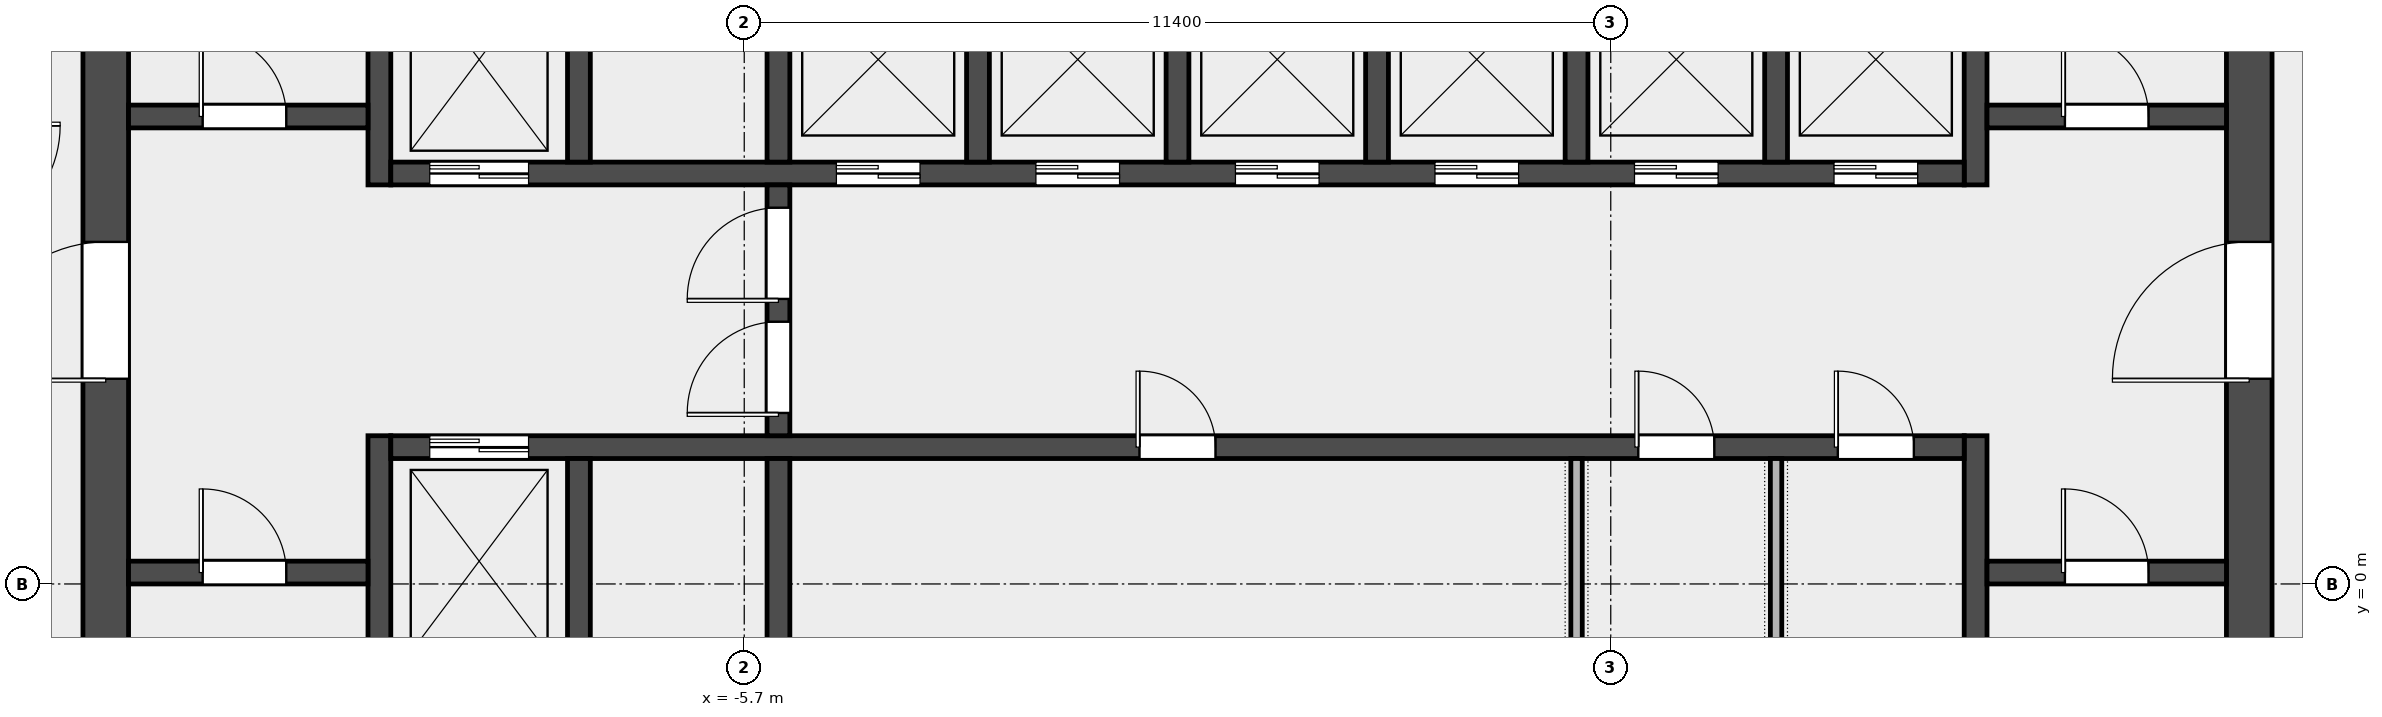
"""IFC4 building model, lengths in metres.
Left out: names, types, materials, properties, quantities, classifications, styles, units other than length and angle.
Written with IfcOpenShell. Run it as: python <this file> out.ifc"""

import sys

from ifc_helpers import new_model, si_unit, direction, frame, frame_2d, origin, place, context, subcontext, project, spatial, rectangle, extrude, element, fill, save


model = new_model("IFC4")
c1 = context("Model", 3, precision=1e-05, world=origin(), true_north=direction((0.0, 1.0)))
c2 = subcontext(c1, "Body", "Model", "MODEL_VIEW")
j1 = project(units=[si_unit("LENGTHUNIT", "METRE"), si_unit("PLANEANGLEUNIT", "RADIAN")], contexts=[c1])
p1 = place(None, origin())
s1 = spatial("IfcSite", under=j1, at=p1, CompositionType="ELEMENT")
p2 = place(p1, origin())
s2 = spatial("IfcBuilding", under=s1, at=p2, CompositionType="ELEMENT")
p3 = place(p2, frame((0.0, 0.0, 227.0)))
s3 = spatial("IfcBuildingStorey", under=s2, at=p3, CompositionType="ELEMENT", Elevation=227.0)
p4 = place(p3, frame((-14.1, -6.6, 0.0), z_axis=(0.0, 0.0, 1.0), x_axis=(0.0, 1.0, 0.0)))
e1 = element("IfcWall", 1, at=p4, inside=s3, PredefinedType="SHEAR", context=c2, shape_type="SweptSolid", body=[
    extrude(rectangle(XDim=19.5, YDim=0.6, at=frame_2d((9.75, 0.0))), origin(), (0.0, 0.0, 1.0), 3.7),
])
p5 = place(p4, frame((9.3, 0.0, 0.0)))
e2 = element("IfcOpeningElement", 2, at=p5, cuts=e1, PredefinedType="OPENING", context=c2, shape_type="SweptSolid", body=[
    extrude(rectangle(XDim=1.8, YDim=2.1, at=frame_2d((0.9, 1.05))), frame((0.0, 0.312, 0.0), z_axis=(0.0, -1.0, 0.0), x_axis=(1.0, 0.0, 0.0)), (0.0, 0.0, 1.0), 0.624),
])
p6 = place(p3, frame((14.1, -6.6, 0.0), z_axis=(0.0, 0.0, 1.0), x_axis=(0.0, 1.0, 0.0)))
e3 = element("IfcWall", 3, at=p6, inside=s3, PredefinedType="SHEAR", context=c2, shape_type="SweptSolid", body=[
    extrude(rectangle(XDim=19.5, YDim=0.6, at=frame_2d((9.75, 0.0))), origin(), (0.0, 0.0, 1.0), 3.7),
])
p7 = place(p6, frame((9.3, 0.0, 0.0)))
e4 = element("IfcOpeningElement", 4, at=p7, cuts=e3, PredefinedType="OPENING", context=c2, shape_type="SweptSolid", body=[
    extrude(rectangle(XDim=1.8, YDim=2.1, at=frame_2d((0.9, 1.05))), frame((0.0, 0.312, 0.0), z_axis=(0.0, -1.0, 0.0), x_axis=(1.0, 0.0, 0.0)), (0.0, 0.0, 1.0), 0.624),
])
p8 = place(p3, frame((-10.5, -6.6, 0.0), z_axis=(0.0, 0.0, 1.0), x_axis=(0.0, 1.0, 0.0)))
e5 = element("IfcWall", 5, at=p8, inside=s3, PredefinedType="SHEAR", context=c2, shape_type="SweptSolid", body=[
    extrude(rectangle(XDim=8.55, YDim=0.3, at=frame_2d((4.275, 0.0))), origin(), (0.0, 0.0, 1.0), 3.7),
])
p9 = place(p3, frame((-10.5, 5.25, 0.0), z_axis=(0.0, 0.0, 1.0), x_axis=(0.0, 1.0, 0.0)))
e6 = element("IfcWall", 6, at=p9, inside=s3, PredefinedType="SHEAR", context=c2, shape_type="SweptSolid", body=[
    extrude(rectangle(XDim=7.65, YDim=0.3, at=frame_2d((3.825, 0.0))), origin(), (0.0, 0.0, 1.0), 3.7),
])
p10 = place(p3, frame((10.5, -6.6, 0.0), z_axis=(0.0, 0.0, 1.0), x_axis=(0.0, 1.0, 0.0)))
e7 = element("IfcWall", 7, at=p10, inside=s3, PredefinedType="SHEAR", context=c2, shape_type="SweptSolid", body=[
    extrude(rectangle(XDim=8.55, YDim=0.3, at=frame_2d((4.275, 0.0))), origin(), (0.0, 0.0, 1.0), 3.7),
])
p11 = place(p3, frame((10.5, 5.25, 0.0), z_axis=(0.0, 0.0, 1.0), x_axis=(0.0, 1.0, 0.0)))
e8 = element("IfcWall", 8, at=p11, inside=s3, PredefinedType="SHEAR", context=c2, shape_type="SweptSolid", body=[
    extrude(rectangle(XDim=7.65, YDim=0.3, at=frame_2d((3.825, 0.0))), origin(), (0.0, 0.0, 1.0), 3.7),
])
p12 = place(p3, frame((-13.8, 0.15, 0.0), z_axis=(0.0, 0.0, 1.0), x_axis=(1.0, 0.0, 0.0)))
e9 = element("IfcWall", 9, at=p12, inside=s3, PredefinedType="SOLIDWALL", context=c2, shape_type="SweptSolid", body=[
    extrude(rectangle(XDim=3.15, YDim=0.3, at=frame_2d((1.575, 0.0))), origin(), (0.0, 0.0, 1.0), 3.7),
])
p13 = place(p12, frame((0.975, 0.0, 0.0)))
e10 = element("IfcOpeningElement", 10, at=p13, cuts=e9, PredefinedType="OPENING", context=c2, shape_type="SweptSolid", body=[
    extrude(rectangle(XDim=1.1, YDim=2.1, at=frame_2d((0.55, 1.05))), frame((0.0, 0.162, 0.0), z_axis=(0.0, -1.0, 0.0), x_axis=(1.0, 0.0, 0.0)), (0.0, 0.0, 1.0), 0.324),
])
p14 = place(p3, frame((-13.8, 6.15, 0.0), z_axis=(0.0, 0.0, 1.0), x_axis=(1.0, 0.0, 0.0)))
e11 = element("IfcWall", 11, at=p14, inside=s3, PredefinedType="SOLIDWALL", context=c2, shape_type="SweptSolid", body=[
    extrude(rectangle(XDim=3.15, YDim=0.3, at=frame_2d((1.575, 0.0))), origin(), (0.0, 0.0, 1.0), 3.7),
])
p15 = place(p14, frame((0.975, 0.0, 0.0)))
e12 = element("IfcOpeningElement", 12, at=p15, cuts=e11, PredefinedType="OPENING", context=c2, shape_type="SweptSolid", body=[
    extrude(rectangle(XDim=1.1, YDim=2.1, at=frame_2d((0.55, 1.05))), frame((0.0, 0.162, 0.0), z_axis=(0.0, -1.0, 0.0), x_axis=(1.0, 0.0, 0.0)), (0.0, 0.0, 1.0), 0.324),
])
p16 = place(p3, frame((10.65, 0.15, 0.0), z_axis=(0.0, 0.0, 1.0), x_axis=(1.0, 0.0, 0.0)))
e13 = element("IfcWall", 13, at=p16, inside=s3, PredefinedType="SOLIDWALL", context=c2, shape_type="SweptSolid", body=[
    extrude(rectangle(XDim=3.15, YDim=0.3, at=frame_2d((1.575, 0.0))), origin(), (0.0, 0.0, 1.0), 3.7),
])
p17 = place(p16, frame((1.025, 0.0, 0.0)))
e14 = element("IfcOpeningElement", 14, at=p17, cuts=e13, PredefinedType="OPENING", context=c2, shape_type="SweptSolid", body=[
    extrude(rectangle(XDim=1.1, YDim=2.1, at=frame_2d((0.55, 1.05))), frame((0.0, 0.162, 0.0), z_axis=(0.0, -1.0, 0.0), x_axis=(1.0, 0.0, 0.0)), (0.0, 0.0, 1.0), 0.324),
])
p18 = place(p3, frame((10.65, 6.15, 0.0), z_axis=(0.0, 0.0, 1.0), x_axis=(1.0, 0.0, 0.0)))
e15 = element("IfcWall", 15, at=p18, inside=s3, PredefinedType="SOLIDWALL", context=c2, shape_type="SweptSolid", body=[
    extrude(rectangle(XDim=3.15, YDim=0.3, at=frame_2d((1.575, 0.0))), origin(), (0.0, 0.0, 1.0), 3.7),
])
p19 = place(p18, frame((1.025, 0.0, 0.0)))
e16 = element("IfcOpeningElement", 16, at=p19, cuts=e15, PredefinedType="OPENING", context=c2, shape_type="SweptSolid", body=[
    extrude(rectangle(XDim=1.1, YDim=2.1, at=frame_2d((0.55, 1.05))), frame((0.0, 0.162, 0.0), z_axis=(0.0, -1.0, 0.0), x_axis=(1.0, 0.0, 0.0)), (0.0, 0.0, 1.0), 0.324),
])
p20 = place(p3, frame((-10.35, 1.8, 0.0), z_axis=(0.0, 0.0, 1.0), x_axis=(1.0, 0.0, 0.0)))
e17 = element("IfcWall", 17, at=p20, inside=s3, PredefinedType="SOLIDWALL", context=c2, shape_type="SweptSolid", body=[
    extrude(rectangle(XDim=20.7, YDim=0.3, at=frame_2d((10.35, 0.0))), origin(), (0.0, 0.0, 1.0), 3.7),
])
p21 = place(p20, frame((0.512, 0.0, 0.0)))
e18 = element("IfcOpeningElement", 18, at=p21, cuts=e17, PredefinedType="OPENING", context=c2, shape_type="SweptSolid", body=[
    extrude(rectangle(XDim=1.3, YDim=2.1, at=frame_2d((0.65, 1.05))), frame((0.0, 0.162, 0.0), z_axis=(0.0, -1.0, 0.0), x_axis=(1.0, 0.0, 0.0)), (0.0, 0.0, 1.0), 0.324),
])
p22 = place(p20, frame((9.85, 0.0, 0.0)))
e19 = element("IfcOpeningElement", 19, at=p22, cuts=e17, PredefinedType="OPENING", context=c2, shape_type="SweptSolid", body=[
    extrude(rectangle(XDim=1.0, YDim=2.1, at=frame_2d((0.5, 1.05))), frame((0.0, 0.162, 0.0), z_axis=(0.0, -1.0, 0.0), x_axis=(1.0, 0.0, 0.0)), (0.0, 0.0, 1.0), 0.324),
])
p23 = place(p20, frame((16.413, 0.0, 0.0)))
e20 = element("IfcOpeningElement", 20, at=p23, cuts=e17, PredefinedType="OPENING", context=c2, shape_type="SweptSolid", body=[
    extrude(rectangle(XDim=1.0, YDim=2.1, at=frame_2d((0.5, 1.05))), frame((0.0, 0.162, 0.0), z_axis=(0.0, -1.0, 0.0), x_axis=(1.0, 0.0, 0.0)), (0.0, 0.0, 1.0), 0.324),
])
p24 = place(p20, frame((19.038, 0.0, 0.0)))
e21 = element("IfcOpeningElement", 21, at=p24, cuts=e17, PredefinedType="OPENING", context=c2, shape_type="SweptSolid", body=[
    extrude(rectangle(XDim=1.0, YDim=2.1, at=frame_2d((0.5, 1.05))), frame((0.0, 0.162, 0.0), z_axis=(0.0, -1.0, 0.0), x_axis=(1.0, 0.0, 0.0)), (0.0, 0.0, 1.0), 0.324),
])
p25 = place(p3, frame((-10.35, 5.4, 0.0), z_axis=(0.0, 0.0, 1.0), x_axis=(1.0, 0.0, 0.0)))
e22 = element("IfcWall", 22, at=p25, inside=s3, PredefinedType="SOLIDWALL", context=c2, shape_type="SweptSolid", body=[
    extrude(rectangle(XDim=20.7, YDim=0.3, at=frame_2d((10.35, 0.0))), origin(), (0.0, 0.0, 1.0), 3.7),
])
p26 = place(p25, frame((0.512, 0.0, 0.0)))
e23 = element("IfcOpeningElement", 23, at=p26, cuts=e22, PredefinedType="OPENING", context=c2, shape_type="SweptSolid", body=[
    extrude(rectangle(XDim=1.3, YDim=2.1, at=frame_2d((0.65, 1.05))), frame((0.0, 0.162, 0.0), z_axis=(0.0, -1.0, 0.0), x_axis=(1.0, 0.0, 0.0)), (0.0, 0.0, 1.0), 0.324),
])
p27 = place(p25, frame((5.863, 0.0, 0.0)))
e24 = element("IfcOpeningElement", 24, at=p27, cuts=e22, PredefinedType="OPENING", context=c2, shape_type="SweptSolid", body=[
    extrude(rectangle(XDim=1.1, YDim=2.1, at=frame_2d((0.55, 1.05))), frame((0.0, 0.162, 0.0), z_axis=(0.0, -1.0, 0.0), x_axis=(1.0, 0.0, 0.0)), (0.0, 0.0, 1.0), 0.324),
])
p28 = place(p25, frame((8.488, 0.0, 0.0)))
e25 = element("IfcOpeningElement", 25, at=p28, cuts=e22, PredefinedType="OPENING", context=c2, shape_type="SweptSolid", body=[
    extrude(rectangle(XDim=1.1, YDim=2.1, at=frame_2d((0.55, 1.05))), frame((0.0, 0.162, 0.0), z_axis=(0.0, -1.0, 0.0), x_axis=(1.0, 0.0, 0.0)), (0.0, 0.0, 1.0), 0.324),
])
p29 = place(p25, frame((11.113, 0.0, 0.0)))
e26 = element("IfcOpeningElement", 26, at=p29, cuts=e22, PredefinedType="OPENING", context=c2, shape_type="SweptSolid", body=[
    extrude(rectangle(XDim=1.1, YDim=2.1, at=frame_2d((0.55, 1.05))), frame((0.0, 0.162, 0.0), z_axis=(0.0, -1.0, 0.0), x_axis=(1.0, 0.0, 0.0)), (0.0, 0.0, 1.0), 0.324),
])
p30 = place(p25, frame((13.738, 0.0, 0.0)))
e27 = element("IfcOpeningElement", 27, at=p30, cuts=e22, PredefinedType="OPENING", context=c2, shape_type="SweptSolid", body=[
    extrude(rectangle(XDim=1.1, YDim=2.1, at=frame_2d((0.55, 1.05))), frame((0.0, 0.162, 0.0), z_axis=(0.0, -1.0, 0.0), x_axis=(1.0, 0.0, 0.0)), (0.0, 0.0, 1.0), 0.324),
])
p31 = place(p25, frame((16.363, 0.0, 0.0)))
e28 = element("IfcOpeningElement", 28, at=p31, cuts=e22, PredefinedType="OPENING", context=c2, shape_type="SweptSolid", body=[
    extrude(rectangle(XDim=1.1, YDim=2.1, at=frame_2d((0.55, 1.05))), frame((0.0, 0.162, 0.0), z_axis=(0.0, -1.0, 0.0), x_axis=(1.0, 0.0, 0.0)), (0.0, 0.0, 1.0), 0.324),
])
p32 = place(p25, frame((18.988, 0.0, 0.0)))
e29 = element("IfcOpeningElement", 29, at=p32, cuts=e22, PredefinedType="OPENING", context=c2, shape_type="SweptSolid", body=[
    extrude(rectangle(XDim=1.1, YDim=2.1, at=frame_2d((0.55, 1.05))), frame((0.0, 0.162, 0.0), z_axis=(0.0, -1.0, 0.0), x_axis=(1.0, 0.0, 0.0)), (0.0, 0.0, 1.0), 0.324),
])
for number, where, z_axis, x_axis in (
    (30, (-7.875, -1.05, 0.0), (0.0, 0.0, 1.0), (0.0, 1.0, 0.0)),
    (31, (-5.25, -1.05, 0.0), (0.0, 0.0, 1.0), (0.0, 1.0, 0.0)),
    (32, (-7.875, 5.55, 0.0), (0.0, 0.0, 1.0), (0.0, 1.0, 0.0)),
    (33, (-5.25, 5.55, 0.0), (0.0, 0.0, 1.0), (0.0, 1.0, 0.0)),
    (34, (-2.625, 5.55, 0.0), (0.0, 0.0, 1.0), (0.0, 1.0, 0.0)),
    (35, (0.0, 5.55, 0.0), (0.0, 0.0, 1.0), (0.0, 1.0, 0.0)),
    (36, (2.625, 5.55, 0.0), (0.0, 0.0, 1.0), (0.0, 1.0, 0.0)),
    (37, (5.25, 5.55, 0.0), (0.0, 0.0, 1.0), (0.0, 1.0, 0.0)),
    (38, (7.875, 5.55, 0.0), (0.0, 0.0, 1.0), (0.0, 1.0, 0.0)),
):
    element("IfcWall", number, at=place(p3, frame(where, z_axis=z_axis, x_axis=x_axis)), inside=s3, PredefinedType="SOLIDWALL", context=c2, shape_type="SweptSolid", body=[
        extrude(rectangle(XDim=2.7, YDim=0.3, at=frame_2d((1.35, 0.0))), origin(), (0.0, 0.0, 1.0), 3.7),
    ])
p33 = place(p3, frame((-5.25, 1.95, 0.0), z_axis=(0.0, 0.0, 1.0), x_axis=(0.0, 1.0, 0.0)))
e39 = element("IfcWall", 39, at=p33, inside=s3, PredefinedType="SOLIDWALL", context=c2, shape_type="SweptSolid", body=[
    extrude(rectangle(XDim=3.3, YDim=0.3, at=frame_2d((1.65, 0.0))), origin(), (0.0, 0.0, 1.0), 3.7),
])
p34 = place(p33, frame((0.3, 0.0, 0.0)))
e40 = element("IfcOpeningElement", 40, at=p34, cuts=e39, PredefinedType="OPENING", context=c2, shape_type="SweptSolid", body=[
    extrude(rectangle(XDim=1.2, YDim=2.1, at=frame_2d((0.6, 1.05))), frame((0.0, 0.162, 0.0), z_axis=(0.0, -1.0, 0.0), x_axis=(1.0, 0.0, 0.0)), (0.0, 0.0, 1.0), 0.324),
])
p35 = place(p33, frame((1.8, 0.0, 0.0)))
e41 = element("IfcOpeningElement", 41, at=p35, cuts=e39, PredefinedType="OPENING", context=c2, shape_type="SweptSolid", body=[
    extrude(rectangle(XDim=1.2, YDim=2.1, at=frame_2d((0.6, 1.05))), frame((0.0, 0.162, 0.0), z_axis=(0.0, -1.0, 0.0), x_axis=(1.0, 0.0, 0.0)), (0.0, 0.0, 1.0), 0.324),
])
for number, where, z_axis, x_axis in (
    (42, (5.25, -1.05, 0.0), (0.0, 0.0, 1.0), (0.0, 1.0, 0.0)),
    (43, (7.875, -1.05, 0.0), (0.0, 0.0, 1.0), (0.0, 1.0, 0.0)),
):
    element("IfcWall", number, at=place(p3, frame(where, z_axis=z_axis, x_axis=x_axis)), inside=s3, PredefinedType="PARTITIONING", context=c2, shape_type="SweptSolid", body=[
        extrude(rectangle(XDim=2.7, YDim=0.15, at=frame_2d((1.35, 0.0))), origin(), (0.0, 0.0, 1.0), 3.7),
    ])
p36 = place(p13, origin())
e44 = element("IfcDoor", 44, at=p36, inside=s3, OperationType="SINGLE_SWING_LEFT", PredefinedType="DOOR", context=c2, shape_type="SweptSolid", body=[
    extrude(rectangle(XDim=1.1, YDim=2.1, at=frame_2d((0.55, 1.05))), frame((0.0, 0.025, 0.0), z_axis=(0.0, -1.0, 0.0), x_axis=(1.0, 0.0, 0.0)), (0.0, 0.0, 1.0), 0.05),
])
fill(e10, e44)
p37 = place(p15, origin())
e45 = element("IfcDoor", 45, at=p37, inside=s3, OperationType="SINGLE_SWING_LEFT", PredefinedType="DOOR", context=c2, shape_type="SweptSolid", body=[
    extrude(rectangle(XDim=1.1, YDim=2.1, at=frame_2d((0.55, 1.05))), frame((0.0, 0.025, 0.0), z_axis=(0.0, -1.0, 0.0), x_axis=(1.0, 0.0, 0.0)), (0.0, 0.0, 1.0), 0.05),
])
fill(e12, e45)
p38 = place(p17, origin())
e46 = element("IfcDoor", 46, at=p38, inside=s3, OperationType="SINGLE_SWING_RIGHT", PredefinedType="DOOR", context=c2, shape_type="SweptSolid", body=[
    extrude(rectangle(XDim=1.1, YDim=2.1, at=frame_2d((0.55, 1.05))), frame((0.0, 0.025, 0.0), z_axis=(0.0, -1.0, 0.0), x_axis=(1.0, 0.0, 0.0)), (0.0, 0.0, 1.0), 0.05),
])
fill(e14, e46)
p39 = place(p19, origin())
e47 = element("IfcDoor", 47, at=p39, inside=s3, OperationType="SINGLE_SWING_RIGHT", PredefinedType="DOOR", context=c2, shape_type="SweptSolid", body=[
    extrude(rectangle(XDim=1.1, YDim=2.1, at=frame_2d((0.55, 1.05))), frame((0.0, 0.025, 0.0), z_axis=(0.0, -1.0, 0.0), x_axis=(1.0, 0.0, 0.0)), (0.0, 0.0, 1.0), 0.05),
])
fill(e16, e47)
p40 = place(p5, origin())
e48 = element("IfcDoor", 48, at=p40, inside=s3, OperationType="DOUBLE_DOOR_SINGLE_SWING", PredefinedType="DOOR", context=c2, shape_type="SweptSolid", body=[
    extrude(rectangle(XDim=1.8, YDim=2.1, at=frame_2d((0.9, 1.05))), frame((0.0, 0.025, 0.0), z_axis=(0.0, -1.0, 0.0), x_axis=(1.0, 0.0, 0.0)), (0.0, 0.0, 1.0), 0.05),
])
fill(e2, e48)
p41 = place(p7, origin())
e49 = element("IfcDoor", 49, at=p41, inside=s3, OperationType="DOUBLE_DOOR_SINGLE_SWING", PredefinedType="DOOR", context=c2, shape_type="SweptSolid", body=[
    extrude(rectangle(XDim=1.8, YDim=2.1, at=frame_2d((0.9, 1.05))), frame((0.0, 0.025, 0.0), z_axis=(0.0, -1.0, 0.0), x_axis=(1.0, 0.0, 0.0)), (0.0, 0.0, 1.0), 0.05),
])
fill(e4, e49)
p42 = place(p34, origin())
e50 = element("IfcDoor", 50, at=p42, inside=s3, OperationType="SINGLE_SWING_LEFT", PredefinedType="DOOR", context=c2, shape_type="SweptSolid", body=[
    extrude(rectangle(XDim=1.2, YDim=2.1, at=frame_2d((0.6, 1.05))), frame((0.0, 0.025, 0.0), z_axis=(0.0, -1.0, 0.0), x_axis=(1.0, 0.0, 0.0)), (0.0, 0.0, 1.0), 0.05),
])
fill(e40, e50)
p43 = place(p35, origin())
e51 = element("IfcDoor", 51, at=p43, inside=s3, OperationType="SINGLE_SWING_RIGHT", PredefinedType="DOOR", context=c2, shape_type="SweptSolid", body=[
    extrude(rectangle(XDim=1.2, YDim=2.1, at=frame_2d((0.6, 1.05))), frame((0.0, 0.025, 0.0), z_axis=(0.0, -1.0, 0.0), x_axis=(1.0, 0.0, 0.0)), (0.0, 0.0, 1.0), 0.05),
])
fill(e41, e51)
p44 = place(p21, origin())
e52 = element("IfcDoor", 52, at=p44, inside=s3, OperationType="DOUBLE_DOOR_SLIDING", PredefinedType="DOOR", context=c2, shape_type="SweptSolid", body=[
    extrude(rectangle(XDim=1.3, YDim=2.1, at=frame_2d((0.65, 1.05))), frame((0.0, 0.025, 0.0), z_axis=(0.0, -1.0, 0.0), x_axis=(1.0, 0.0, 0.0)), (0.0, 0.0, 1.0), 0.05),
])
fill(e18, e52)
p45 = place(p26, origin())
e53 = element("IfcDoor", 53, at=p45, inside=s3, OperationType="DOUBLE_DOOR_SLIDING", PredefinedType="DOOR", context=c2, shape_type="SweptSolid", body=[
    extrude(rectangle(XDim=1.3, YDim=2.1, at=frame_2d((0.65, 1.05))), frame((0.0, 0.025, 0.0), z_axis=(0.0, -1.0, 0.0), x_axis=(1.0, 0.0, 0.0)), (0.0, 0.0, 1.0), 0.05),
])
fill(e23, e53)
p46 = place(p27, origin())
e54 = element("IfcDoor", 54, at=p46, inside=s3, OperationType="DOUBLE_DOOR_SLIDING", PredefinedType="DOOR", context=c2, shape_type="SweptSolid", body=[
    extrude(rectangle(XDim=1.1, YDim=2.1, at=frame_2d((0.55, 1.05))), frame((0.0, 0.025, 0.0), z_axis=(0.0, -1.0, 0.0), x_axis=(1.0, 0.0, 0.0)), (0.0, 0.0, 1.0), 0.05),
])
fill(e24, e54)
p47 = place(p28, origin())
e55 = element("IfcDoor", 55, at=p47, inside=s3, OperationType="DOUBLE_DOOR_SLIDING", PredefinedType="DOOR", context=c2, shape_type="SweptSolid", body=[
    extrude(rectangle(XDim=1.1, YDim=2.1, at=frame_2d((0.55, 1.05))), frame((0.0, 0.025, 0.0), z_axis=(0.0, -1.0, 0.0), x_axis=(1.0, 0.0, 0.0)), (0.0, 0.0, 1.0), 0.05),
])
fill(e25, e55)
p48 = place(p29, origin())
e56 = element("IfcDoor", 56, at=p48, inside=s3, OperationType="DOUBLE_DOOR_SLIDING", PredefinedType="DOOR", context=c2, shape_type="SweptSolid", body=[
    extrude(rectangle(XDim=1.1, YDim=2.1, at=frame_2d((0.55, 1.05))), frame((0.0, 0.025, 0.0), z_axis=(0.0, -1.0, 0.0), x_axis=(1.0, 0.0, 0.0)), (0.0, 0.0, 1.0), 0.05),
])
fill(e26, e56)
p49 = place(p30, origin())
e57 = element("IfcDoor", 57, at=p49, inside=s3, OperationType="DOUBLE_DOOR_SLIDING", PredefinedType="DOOR", context=c2, shape_type="SweptSolid", body=[
    extrude(rectangle(XDim=1.1, YDim=2.1, at=frame_2d((0.55, 1.05))), frame((0.0, 0.025, 0.0), z_axis=(0.0, -1.0, 0.0), x_axis=(1.0, 0.0, 0.0)), (0.0, 0.0, 1.0), 0.05),
])
fill(e27, e57)
p50 = place(p31, origin())
e58 = element("IfcDoor", 58, at=p50, inside=s3, OperationType="DOUBLE_DOOR_SLIDING", PredefinedType="DOOR", context=c2, shape_type="SweptSolid", body=[
    extrude(rectangle(XDim=1.1, YDim=2.1, at=frame_2d((0.55, 1.05))), frame((0.0, 0.025, 0.0), z_axis=(0.0, -1.0, 0.0), x_axis=(1.0, 0.0, 0.0)), (0.0, 0.0, 1.0), 0.05),
])
fill(e28, e58)
p51 = place(p32, origin())
e59 = element("IfcDoor", 59, at=p51, inside=s3, OperationType="DOUBLE_DOOR_SLIDING", PredefinedType="DOOR", context=c2, shape_type="SweptSolid", body=[
    extrude(rectangle(XDim=1.1, YDim=2.1, at=frame_2d((0.55, 1.05))), frame((0.0, 0.025, 0.0), z_axis=(0.0, -1.0, 0.0), x_axis=(1.0, 0.0, 0.0)), (0.0, 0.0, 1.0), 0.05),
])
fill(e29, e59)
p52 = place(p22, origin())
e60 = element("IfcDoor", 60, at=p52, inside=s3, OperationType="SINGLE_SWING_LEFT", PredefinedType="DOOR", context=c2, shape_type="SweptSolid", body=[
    extrude(rectangle(XDim=1.0, YDim=2.1, at=frame_2d((0.5, 1.05))), frame((0.0, 0.025, 0.0), z_axis=(0.0, -1.0, 0.0), x_axis=(1.0, 0.0, 0.0)), (0.0, 0.0, 1.0), 0.05),
])
fill(e19, e60)
p53 = place(p23, origin())
e61 = element("IfcDoor", 61, at=p53, inside=s3, OperationType="SINGLE_SWING_LEFT", PredefinedType="DOOR", context=c2, shape_type="SweptSolid", body=[
    extrude(rectangle(XDim=1.0, YDim=2.1, at=frame_2d((0.5, 1.05))), frame((0.0, 0.025, 0.0), z_axis=(0.0, -1.0, 0.0), x_axis=(1.0, 0.0, 0.0)), (0.0, 0.0, 1.0), 0.05),
])
fill(e20, e61)
p54 = place(p24, origin())
e62 = element("IfcDoor", 62, at=p54, inside=s3, OperationType="SINGLE_SWING_LEFT", PredefinedType="DOOR", context=c2, shape_type="SweptSolid", body=[
    extrude(rectangle(XDim=1.0, YDim=2.1, at=frame_2d((0.5, 1.05))), frame((0.0, 0.025, 0.0), z_axis=(0.0, -1.0, 0.0), x_axis=(1.0, 0.0, 0.0)), (0.0, 0.0, 1.0), 0.05),
])
fill(e21, e62)
save(model, sys.argv[1])
